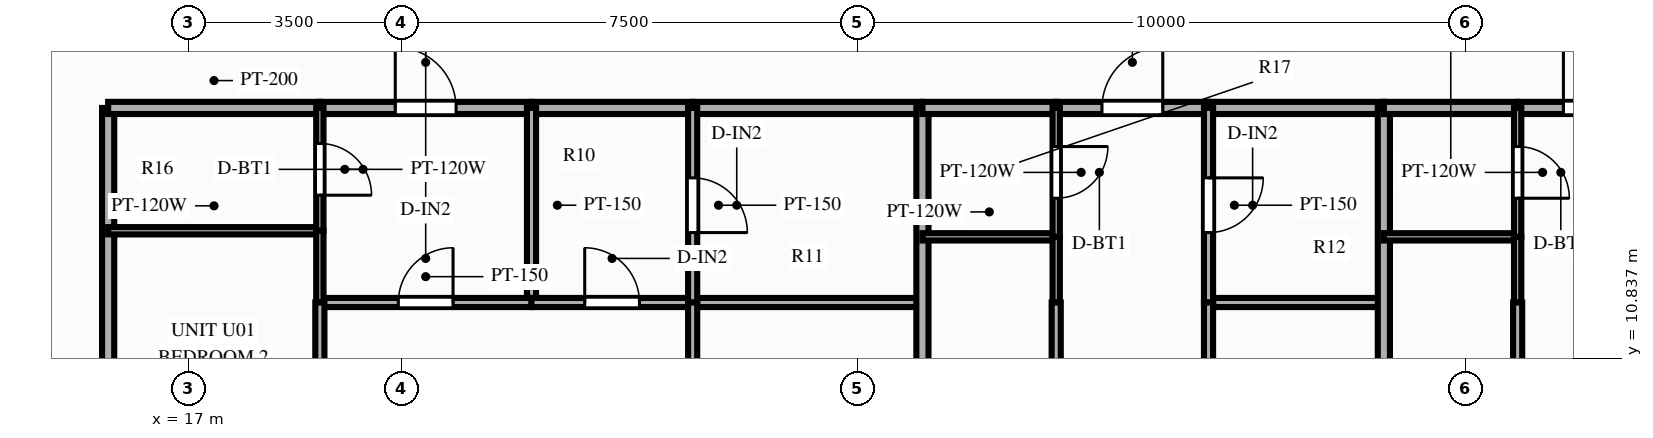
"""IFC4 building model, lengths in metres.
Left out: names, types, materials, properties, quantities, classifications, styles, units other than length and angle.
Written with IfcOpenShell. Run it as: python <this file> out.ifc"""

import sys

from ifc_helpers import new_model, si_unit, direction, frame, frame_2d, origin, place, context, subcontext, project, spatial, rectangle, extrude, source, transform, mapped, element, fill, save


model = new_model("IFC4")
c1 = context("Model", 3, precision=1e-05, world=origin(), true_north=direction((0.0, 1.0)))
c2 = subcontext(c1, "Body", "Model", "MODEL_VIEW")
j1 = project(units=[si_unit("LENGTHUNIT", "METRE"), si_unit("PLANEANGLEUNIT", "RADIAN")], contexts=[c1])
p1 = place(None, origin())
s1 = spatial("IfcSite", under=j1, at=p1, CompositionType="ELEMENT")
p2 = place(p1, origin())
s2 = spatial("IfcBuilding", under=s1, at=p2, CompositionType="ELEMENT")
p3 = place(p2, frame((0.0, 0.0, 61.4)))
s3 = spatial("IfcBuildingStorey", under=s2, at=p3, CompositionType="ELEMENT", Elevation=61.4)
p4 = place(p3, frame((15.68, 14.95, 0.0), z_axis=(0.0, 0.0, 1.0), x_axis=(0.0, -1.0, 0.0)))
e1 = element("IfcWall", 1, at=p4, inside=s3, PredefinedType="PARTITIONING", context=c2, shape_type="SweptSolid", body=[
    extrude(rectangle(XDim=11.8, YDim=0.2, at=frame_2d((5.9, 0.0))), origin(), (0.0, 0.0, 1.0), 2.79),
])
p5 = place(p3, frame((15.68, 14.95, 0.0), z_axis=(0.0, 0.0, 1.0), x_axis=(1.0, 0.0, 0.0)))
e2 = element("IfcWall", 2, at=p5, inside=s3, PredefinedType="PARTITIONING", context=c2, shape_type="SweptSolid", body=[
    extrude(rectangle(XDim=3.482, YDim=0.2, at=frame_2d((1.741, 0.0))), origin(), (0.0, 0.0, 1.0), 2.79),
])
p6 = place(p3, frame((19.162, 14.95, 0.0), z_axis=(0.0, 0.0, 1.0), x_axis=(1.0, 0.0, 0.0)))
e3 = element("IfcWall", 3, at=p6, inside=s3, PredefinedType="PARTITIONING", context=c2, shape_type="SweptSolid", body=[
    extrude(rectangle(XDim=3.481, YDim=0.2, at=frame_2d((1.74, 0.0))), origin(), (0.0, 0.0, 1.0), 2.79),
])
p7 = place(p6, frame((1.24, 0.0, 0.0)))
e4 = element("IfcOpeningElement", 4, at=p7, cuts=e3, PredefinedType="OPENING", context=c2, shape_type="SweptSolid", body=[
    extrude(rectangle(XDim=1.0, YDim=2.15, at=frame_2d((0.5, 1.075))), frame((0.0, 0.112, 0.0), z_axis=(0.0, -1.0, 0.0), x_axis=(1.0, 0.0, 0.0)), (0.0, 0.0, 1.0), 0.224),
])
p8 = place(p3, frame((22.643, 14.95, 0.0), z_axis=(0.0, 0.0, 1.0), x_axis=(1.0, 0.0, 0.0)))
e5 = element("IfcWall", 5, at=p8, inside=s3, PredefinedType="PARTITIONING", context=c2, shape_type="SweptSolid", body=[
    extrude(rectangle(XDim=2.65, YDim=0.2, at=frame_2d((1.325, 0.0))), origin(), (0.0, 0.0, 1.0), 2.79),
])
p9 = place(p3, frame((22.643, 14.95, 0.0), z_axis=(0.0, 0.0, 1.0), x_axis=(0.0, -1.0, 0.0)))
e6 = element("IfcWall", 6, at=p9, inside=s3, PredefinedType="PARTITIONING", context=c2, shape_type="SweptSolid", body=[
    extrude(rectangle(XDim=3.2, YDim=0.15, at=frame_2d((1.6, 0.0))), origin(), (0.0, 0.0, 1.0), 2.79),
])
p10 = place(p3, frame((19.162, 11.75, 0.0), z_axis=(0.0, 0.0, 1.0), x_axis=(1.0, 0.0, 0.0)))
e7 = element("IfcWall", 7, at=p10, inside=s3, PredefinedType="PARTITIONING", context=c2, shape_type="SweptSolid", body=[
    extrude(rectangle(XDim=3.481, YDim=0.15, at=frame_2d((1.74, 0.0))), origin(), (0.0, 0.0, 1.0), 2.79),
])
p11 = place(p10, frame((1.291, 0.0, 0.0)))
e8 = element("IfcOpeningElement", 8, at=p11, cuts=e7, PredefinedType="OPENING", context=c2, shape_type="SweptSolid", body=[
    extrude(rectangle(XDim=0.9, YDim=2.1, at=frame_2d((0.45, 1.05))), frame((0.0, 0.087, 0.0), z_axis=(0.0, -1.0, 0.0), x_axis=(1.0, 0.0, 0.0)), (0.0, 0.0, 1.0), 0.174),
])
p12 = place(p3, frame((22.643, 11.75, 0.0), z_axis=(0.0, 0.0, 1.0), x_axis=(1.0, 0.0, 0.0)))
e9 = element("IfcWall", 9, at=p12, inside=s3, PredefinedType="PARTITIONING", context=c2, shape_type="SweptSolid", body=[
    extrude(rectangle(XDim=2.65, YDim=0.15, at=frame_2d((1.325, 0.0))), origin(), (0.0, 0.0, 1.0), 2.79),
])
p13 = place(p12, frame((0.875, 0.0, 0.0)))
e10 = element("IfcOpeningElement", 10, at=p13, cuts=e9, PredefinedType="OPENING", context=c2, shape_type="SweptSolid", body=[
    extrude(rectangle(XDim=0.9, YDim=2.1, at=frame_2d((0.45, 1.05))), frame((0.0, 0.087, 0.0), z_axis=(0.0, -1.0, 0.0), x_axis=(1.0, 0.0, 0.0)), (0.0, 0.0, 1.0), 0.174),
])
p14 = place(p3, frame((25.293, 14.95, 0.0), z_axis=(0.0, 0.0, 1.0), x_axis=(1.0, 0.0, 0.0)))
e11 = element("IfcWall", 11, at=p14, inside=s3, PredefinedType="PARTITIONING", context=c2, shape_type="SweptSolid", body=[
    extrude(rectangle(XDim=3.779, YDim=0.2, at=frame_2d((1.89, 0.0))), origin(), (0.0, 0.0, 1.0), 2.79),
])
p15 = place(p3, frame((15.68, 12.93, 0.0), z_axis=(0.0, 0.0, 1.0), x_axis=(1.0, 0.0, 0.0)))
e12 = element("IfcWall", 12, at=p15, inside=s3, PredefinedType="PARTITIONING", context=c2, shape_type="SweptSolid", body=[
    extrude(rectangle(XDim=3.482, YDim=0.12, at=frame_2d((1.741, 0.0))), origin(), (0.0, 0.0, 1.0), 2.79),
])
p16 = place(p3, frame((25.293, 11.75, 0.0), z_axis=(0.0, 0.0, 1.0), x_axis=(1.0, 0.0, 0.0)))
e13 = element("IfcWall", 13, at=p16, inside=s3, PredefinedType="PARTITIONING", context=c2, shape_type="SweptSolid", body=[
    extrude(rectangle(XDim=3.779, YDim=0.15, at=frame_2d((1.89, 0.0))), origin(), (0.0, 0.0, 1.0), 2.79),
])
p17 = place(p3, frame((19.162, 14.95, 0.0), z_axis=(0.0, 0.0, 1.0), x_axis=(0.0, -1.0, 0.0)))
e14 = element("IfcWall", 14, at=p17, inside=s3, PredefinedType="PARTITIONING", context=c2, shape_type="SweptSolid", body=[
    extrude(rectangle(XDim=2.02, YDim=0.12, at=frame_2d((1.01, 0.0))), origin(), (0.0, 0.0, 1.0), 2.79),
])
p18 = place(p17, frame((0.585, 0.0, 0.0)))
e15 = element("IfcOpeningElement", 15, at=p18, cuts=e14, PredefinedType="OPENING", context=c2, shape_type="SweptSolid", body=[
    extrude(rectangle(XDim=0.85, YDim=2.05, at=frame_2d((0.425, 1.025))), frame((0.0, 0.072, 0.0), z_axis=(0.0, -1.0, 0.0), x_axis=(1.0, 0.0, 0.0)), (0.0, 0.0, 1.0), 0.144),
])
p19 = place(p3, frame((19.162, 12.93, 0.0), z_axis=(0.0, 0.0, 1.0), x_axis=(0.0, -1.0, 0.0)))
e16 = element("IfcWall", 16, at=p19, inside=s3, PredefinedType="PARTITIONING", context=c2, shape_type="SweptSolid", body=[
    extrude(rectangle(XDim=1.18, YDim=0.12, at=frame_2d((0.59, 0.0))), origin(), (0.0, 0.0, 1.0), 2.79),
])
p20 = place(p3, frame((19.162, 11.75, 0.0), z_axis=(0.0, 0.0, 1.0), x_axis=(0.0, -1.0, 0.0)))
e17 = element("IfcWall", 17, at=p20, inside=s3, PredefinedType="PARTITIONING", context=c2, shape_type="SweptSolid", body=[
    extrude(rectangle(XDim=8.6, YDim=0.15, at=frame_2d((4.3, 0.0))), origin(), (0.0, 0.0, 1.0), 2.79),
])
p21 = place(p20, frame((3.549, 0.0, 0.0)))
e18 = element("IfcOpeningElement", 18, at=p21, cuts=e17, PredefinedType="OPENING", context=c2, shape_type="SweptSolid", body=[
    extrude(rectangle(XDim=0.9, YDim=2.1, at=frame_2d((0.45, 1.05))), frame((0.0, 0.087, 0.0), z_axis=(0.0, -1.0, 0.0), x_axis=(1.0, 0.0, 0.0)), (0.0, 0.0, 1.0), 0.174),
])
p22 = place(p3, frame((25.293, 14.95, 0.0), z_axis=(0.0, 0.0, 1.0), x_axis=(0.0, -1.0, 0.0)))
e19 = element("IfcWall", 19, at=p22, inside=s3, PredefinedType="PARTITIONING", context=c2, shape_type="SweptSolid", body=[
    extrude(rectangle(XDim=3.2, YDim=0.15, at=frame_2d((1.6, 0.0))), origin(), (0.0, 0.0, 1.0), 2.79),
])
p23 = place(p22, frame((1.15, 0.0, 0.0)))
e20 = element("IfcOpeningElement", 20, at=p23, cuts=e19, PredefinedType="OPENING", context=c2, shape_type="SweptSolid", body=[
    extrude(rectangle(XDim=0.9, YDim=2.1, at=frame_2d((0.45, 1.05))), frame((0.0, 0.087, 0.0), z_axis=(0.0, -1.0, 0.0), x_axis=(1.0, 0.0, 0.0)), (0.0, 0.0, 1.0), 0.174),
])
p24 = place(p3, frame((25.293, 11.75, 0.0), z_axis=(0.0, 0.0, 1.0), x_axis=(0.0, -1.0, 0.0)))
e21 = element("IfcWall", 21, at=p24, inside=s3, PredefinedType="PARTITIONING", context=c2, shape_type="SweptSolid", body=[
    extrude(rectangle(XDim=8.6, YDim=0.15, at=frame_2d((4.3, 0.0))), origin(), (0.0, 0.0, 1.0), 2.79),
])
p25 = place(p24, frame((3.549, 0.0, 0.0)))
e22 = element("IfcOpeningElement", 22, at=p25, cuts=e21, PredefinedType="OPENING", context=c2, shape_type="SweptSolid", body=[
    extrude(rectangle(XDim=0.9, YDim=2.1, at=frame_2d((0.45, 1.05))), frame((0.0, 0.087, 0.0), z_axis=(0.0, -1.0, 0.0), x_axis=(1.0, 0.0, 0.0)), (0.0, 0.0, 1.0), 0.174),
])
p26 = place(p3, frame((29.072, 14.95, 0.0), z_axis=(0.0, 0.0, 1.0), x_axis=(0.0, -1.0, 0.0)))
e23 = element("IfcWall", 23, at=p26, inside=s3, PredefinedType="PARTITIONING", context=c2, shape_type="SweptSolid", body=[
    extrude(rectangle(XDim=11.8, YDim=0.2, at=frame_2d((5.9, 0.0))), origin(), (0.0, 0.0, 1.0), 2.79),
])
p27 = place(p3, frame((29.072, 14.95, 0.0), z_axis=(0.0, 0.0, 1.0), x_axis=(1.0, 0.0, 0.0)))
e24 = element("IfcWall", 24, at=p27, inside=s3, PredefinedType="PARTITIONING", context=c2, shape_type="SweptSolid", body=[
    extrude(rectangle(XDim=2.2, YDim=0.2, at=frame_2d((1.1, 0.0))), origin(), (0.0, 0.0, 1.0), 2.79),
])
p28 = place(p3, frame((31.272, 14.95, 0.0), z_axis=(0.0, 0.0, 1.0), x_axis=(1.0, 0.0, 0.0)))
e25 = element("IfcWall", 25, at=p28, inside=s3, PredefinedType="PARTITIONING", context=c2, shape_type="SweptSolid", body=[
    extrude(rectangle(XDim=2.505, YDim=0.2, at=frame_2d((1.252, 0.0))), origin(), (0.0, 0.0, 1.0), 2.79),
])
p29 = place(p28, frame((0.752, 0.0, 0.0)))
e26 = element("IfcOpeningElement", 26, at=p29, cuts=e25, PredefinedType="OPENING", context=c2, shape_type="SweptSolid", body=[
    extrude(rectangle(XDim=1.0, YDim=2.15, at=frame_2d((0.5, 1.075))), frame((0.0, 0.112, 0.0), z_axis=(0.0, -1.0, 0.0), x_axis=(1.0, 0.0, 0.0)), (0.0, 0.0, 1.0), 0.224),
])
p30 = place(p3, frame((33.777, 14.95, 0.0), z_axis=(0.0, 0.0, 1.0), x_axis=(1.0, 0.0, 0.0)))
e27 = element("IfcWall", 27, at=p30, inside=s3, PredefinedType="PARTITIONING", context=c2, shape_type="SweptSolid", body=[
    extrude(rectangle(XDim=2.884, YDim=0.2, at=frame_2d((1.442, 0.0))), origin(), (0.0, 0.0, 1.0), 2.79),
])
p31 = place(p3, frame((29.072, 12.83, 0.0), z_axis=(0.0, 0.0, 1.0), x_axis=(1.0, 0.0, 0.0)))
e28 = element("IfcWall", 28, at=p31, inside=s3, PredefinedType="PARTITIONING", context=c2, shape_type="SweptSolid", body=[
    extrude(rectangle(XDim=2.2, YDim=0.12, at=frame_2d((1.1, 0.0))), origin(), (0.0, 0.0, 1.0), 2.79),
])
p32 = place(p3, frame((33.777, 11.75, 0.0), z_axis=(0.0, 0.0, 1.0), x_axis=(1.0, 0.0, 0.0)))
e29 = element("IfcWall", 29, at=p32, inside=s3, PredefinedType="PARTITIONING", context=c2, shape_type="SweptSolid", body=[
    extrude(rectangle(XDim=2.884, YDim=0.15, at=frame_2d((1.442, 0.0))), origin(), (0.0, 0.0, 1.0), 2.79),
])
p33 = place(p3, frame((31.272, 14.95, 0.0), z_axis=(0.0, 0.0, 1.0), x_axis=(0.0, -1.0, 0.0)))
e30 = element("IfcWall", 30, at=p33, inside=s3, PredefinedType="PARTITIONING", context=c2, shape_type="SweptSolid", body=[
    extrude(rectangle(XDim=2.12, YDim=0.12, at=frame_2d((1.06, 0.0))), origin(), (0.0, 0.0, 1.0), 2.24),
])
p34 = place(p33, frame((0.635, 0.0, 0.0)))
e31 = element("IfcOpeningElement", 31, at=p34, cuts=e30, PredefinedType="OPENING", context=c2, shape_type="SweptSolid", body=[
    extrude(rectangle(XDim=0.85, YDim=2.05, at=frame_2d((0.425, 1.025))), frame((0.0, 0.072, 0.0), z_axis=(0.0, -1.0, 0.0), x_axis=(1.0, 0.0, 0.0)), (0.0, 0.0, 1.0), 0.144),
])
p35 = place(p3, frame((31.272, 12.83, 0.0), z_axis=(0.0, 0.0, 1.0), x_axis=(0.0, -1.0, 0.0)))
e32 = element("IfcWall", 32, at=p35, inside=s3, PredefinedType="PARTITIONING", context=c2, shape_type="SweptSolid", body=[
    extrude(rectangle(XDim=1.08, YDim=0.12, at=frame_2d((0.54, 0.0))), origin(), (0.0, 0.0, 1.0), 2.24),
])
p36 = place(p3, frame((31.272, 11.75, 0.0), z_axis=(0.0, 0.0, 1.0), x_axis=(0.0, -1.0, 0.0)))
e33 = element("IfcWall", 33, at=p36, inside=s3, PredefinedType="PARTITIONING", context=c2, shape_type="SweptSolid", body=[
    extrude(rectangle(XDim=8.6, YDim=0.15, at=frame_2d((4.3, 0.0))), origin(), (0.0, 0.0, 1.0), 2.24),
])
p37 = place(p36, frame((3.549, 0.0, 0.0)))
e34 = element("IfcOpeningElement", 34, at=p37, cuts=e33, PredefinedType="OPENING", context=c2, shape_type="SweptSolid", body=[
    extrude(rectangle(XDim=0.9, YDim=2.1, at=frame_2d((0.45, 1.05))), frame((0.0, 0.087, 0.0), z_axis=(0.0, -1.0, 0.0), x_axis=(1.0, 0.0, 0.0)), (0.0, 0.0, 1.0), 0.174),
])
p38 = place(p3, frame((33.777, 14.95, 0.0), z_axis=(0.0, 0.0, 1.0), x_axis=(0.0, -1.0, 0.0)))
e35 = element("IfcWall", 35, at=p38, inside=s3, PredefinedType="PARTITIONING", context=c2, shape_type="SweptSolid", body=[
    extrude(rectangle(XDim=3.2, YDim=0.15, at=frame_2d((1.6, 0.0))), origin(), (0.0, 0.0, 1.0), 2.79),
])
p39 = place(p38, frame((1.15, 0.0, 0.0)))
e36 = element("IfcOpeningElement", 36, at=p39, cuts=e35, PredefinedType="OPENING", context=c2, shape_type="SweptSolid", body=[
    extrude(rectangle(XDim=0.9, YDim=2.1, at=frame_2d((0.45, 1.05))), frame((0.0, 0.087, 0.0), z_axis=(0.0, -1.0, 0.0), x_axis=(1.0, 0.0, 0.0)), (0.0, 0.0, 1.0), 0.174),
])
p40 = place(p3, frame((33.777, 11.75, 0.0), z_axis=(0.0, 0.0, 1.0), x_axis=(0.0, -1.0, 0.0)))
e37 = element("IfcWall", 37, at=p40, inside=s3, PredefinedType="PARTITIONING", context=c2, shape_type="SweptSolid", body=[
    extrude(rectangle(XDim=8.6, YDim=0.15, at=frame_2d((4.3, 0.0))), origin(), (0.0, 0.0, 1.0), 2.79),
])
p41 = place(p40, frame((3.549, 0.0, 0.0)))
e38 = element("IfcOpeningElement", 38, at=p41, cuts=e37, PredefinedType="OPENING", context=c2, shape_type="SweptSolid", body=[
    extrude(rectangle(XDim=0.9, YDim=2.1, at=frame_2d((0.45, 1.05))), frame((0.0, 0.087, 0.0), z_axis=(0.0, -1.0, 0.0), x_axis=(1.0, 0.0, 0.0)), (0.0, 0.0, 1.0), 0.174),
])
p42 = place(p3, frame((36.661, 14.95, 0.0), z_axis=(0.0, 0.0, 1.0), x_axis=(0.0, -1.0, 0.0)))
e39 = element("IfcWall", 39, at=p42, inside=s3, PredefinedType="PARTITIONING", context=c2, shape_type="SweptSolid", body=[
    extrude(rectangle(XDim=11.8, YDim=0.2, at=frame_2d((5.9, 0.0))), origin(), (0.0, 0.0, 1.0), 2.79),
])
p43 = place(p3, frame((36.661, 14.95, 0.0), z_axis=(0.0, 0.0, 1.0), x_axis=(1.0, 0.0, 0.0)))
e40 = element("IfcWall", 40, at=p43, inside=s3, PredefinedType="PARTITIONING", context=c2, shape_type="SweptSolid", body=[
    extrude(rectangle(XDim=2.2, YDim=0.2, at=frame_2d((1.1, 0.0))), origin(), (0.0, 0.0, 1.0), 2.79),
])
p44 = place(p3, frame((38.861, 14.95, 0.0), z_axis=(0.0, 0.0, 1.0), x_axis=(1.0, 0.0, 0.0)))
e41 = element("IfcWall", 41, at=p44, inside=s3, PredefinedType="PARTITIONING", context=c2, shape_type="SweptSolid", body=[
    extrude(rectangle(XDim=2.505, YDim=0.2, at=frame_2d((1.252, 0.0))), origin(), (0.0, 0.0, 1.0), 2.79),
])
p45 = place(p44, frame((0.753, 0.0, 0.0)))
e42 = element("IfcOpeningElement", 42, at=p45, cuts=e41, PredefinedType="OPENING", context=c2, shape_type="SweptSolid", body=[
    extrude(rectangle(XDim=1.0, YDim=2.15, at=frame_2d((0.5, 1.075))), frame((0.0, 0.112, 0.0), z_axis=(0.0, -1.0, 0.0), x_axis=(1.0, 0.0, 0.0)), (0.0, 0.0, 1.0), 0.224),
])
p46 = place(p3, frame((36.661, 12.83, 0.0), z_axis=(0.0, 0.0, 1.0), x_axis=(1.0, 0.0, 0.0)))
e43 = element("IfcWall", 43, at=p46, inside=s3, PredefinedType="PARTITIONING", context=c2, shape_type="SweptSolid", body=[
    extrude(rectangle(XDim=2.2, YDim=0.12, at=frame_2d((1.1, 0.0))), origin(), (0.0, 0.0, 1.0), 2.79),
])
p47 = place(p3, frame((38.861, 14.95, 0.0), z_axis=(0.0, 0.0, 1.0), x_axis=(0.0, -1.0, 0.0)))
e44 = element("IfcWall", 44, at=p47, inside=s3, PredefinedType="PARTITIONING", context=c2, shape_type="SweptSolid", body=[
    extrude(rectangle(XDim=2.12, YDim=0.12, at=frame_2d((1.06, 0.0))), origin(), (0.0, 0.0, 1.0), 2.79),
])
p48 = place(p47, frame((0.635, 0.0, 0.0)))
e45 = element("IfcOpeningElement", 45, at=p48, cuts=e44, PredefinedType="OPENING", context=c2, shape_type="SweptSolid", body=[
    extrude(rectangle(XDim=0.85, YDim=2.05, at=frame_2d((0.425, 1.025))), frame((0.0, 0.072, 0.0), z_axis=(0.0, -1.0, 0.0), x_axis=(1.0, 0.0, 0.0)), (0.0, 0.0, 1.0), 0.144),
])
p49 = place(p3, frame((38.861, 12.83, 0.0), z_axis=(0.0, 0.0, 1.0), x_axis=(0.0, -1.0, 0.0)))
e46 = element("IfcWall", 46, at=p49, inside=s3, PredefinedType="PARTITIONING", context=c2, shape_type="SweptSolid", body=[
    extrude(rectangle(XDim=1.08, YDim=0.12, at=frame_2d((0.54, 0.0))), origin(), (0.0, 0.0, 1.0), 2.79),
])
p50 = place(p3, frame((38.861, 11.75, 0.0), z_axis=(0.0, 0.0, 1.0), x_axis=(0.0, -1.0, 0.0)))
e47 = element("IfcWall", 47, at=p50, inside=s3, PredefinedType="PARTITIONING", context=c2, shape_type="SweptSolid", body=[
    extrude(rectangle(XDim=8.6, YDim=0.15, at=frame_2d((4.3, 0.0))), origin(), (0.0, 0.0, 1.0), 2.79),
])
p51 = place(p50, frame((3.549, 0.0, 0.0)))
e48 = element("IfcOpeningElement", 48, at=p51, cuts=e47, PredefinedType="OPENING", context=c2, shape_type="SweptSolid", body=[
    extrude(rectangle(XDim=0.9, YDim=2.1, at=frame_2d((0.45, 1.05))), frame((0.0, 0.087, 0.0), z_axis=(0.0, -1.0, 0.0), x_axis=(1.0, 0.0, 0.0)), (0.0, 0.0, 1.0), 0.174),
])
m1 = source(origin(), c2, "Body", "SweptSolid", [
    extrude(rectangle(XDim=1.0, YDim=2.15, at=frame_2d((0.5, 1.075))), frame((0.0, 0.025, 0.0), z_axis=(0.0, -1.0, 0.0), x_axis=(1.0, 0.0, 0.0)), (0.0, 0.0, 1.0), 0.05),
])
p52 = place(p7, origin())
e49 = element("IfcDoor", 49, at=p52, inside=s3, OperationType="SINGLE_SWING_LEFT", PredefinedType="DOOR", context=c2, shape_type="MappedRepresentation", body=[
    mapped(m1, transform((0.0, 0.0, 0.0), scale=1.0)),
])
fill(e4, e49)
m2 = source(origin(), c2, "Body", "SweptSolid", [
    extrude(rectangle(XDim=0.9, YDim=2.1, at=frame_2d((0.45, 1.05))), frame((0.0, 0.025, 0.0), z_axis=(0.0, -1.0, 0.0), x_axis=(1.0, 0.0, 0.0)), (0.0, 0.0, 1.0), 0.05),
])
p53 = place(p11, origin())
e50 = element("IfcDoor", 50, at=p53, inside=s3, OperationType="SINGLE_SWING_RIGHT", PredefinedType="DOOR", context=c2, shape_type="MappedRepresentation", body=[
    mapped(m2, transform((0.0, 0.0, 0.0), scale=1.0)),
])
fill(e8, e50)
p54 = place(p13, origin())
e51 = element("IfcDoor", 51, at=p54, inside=s3, OperationType="SINGLE_SWING_LEFT", PredefinedType="DOOR", context=c2, shape_type="MappedRepresentation", body=[
    mapped(m2, transform((0.0, 0.0, 0.0), scale=1.0)),
])
fill(e10, e51)
m3 = source(origin(), c2, "Body", "SweptSolid", [
    extrude(rectangle(XDim=0.85, YDim=2.05, at=frame_2d((0.425, 1.025))), frame((0.0, 0.025, 0.0), z_axis=(0.0, -1.0, 0.0), x_axis=(1.0, 0.0, 0.0)), (0.0, 0.0, 1.0), 0.05),
])
p55 = place(p18, origin())
e52 = element("IfcDoor", 52, at=p55, inside=s3, OperationType="SINGLE_SWING_RIGHT", PredefinedType="DOOR", context=c2, shape_type="MappedRepresentation", body=[
    mapped(m3, transform((0.0, 0.0, 0.0), scale=1.0)),
])
fill(e15, e52)
p56 = place(p23, origin())
e53 = element("IfcDoor", 53, at=p56, inside=s3, OperationType="SINGLE_SWING_RIGHT", PredefinedType="DOOR", context=c2, shape_type="MappedRepresentation", body=[
    mapped(m2, transform((0.0, 0.0, 0.0), scale=1.0)),
])
fill(e20, e53)
p57 = place(p29, origin())
e54 = element("IfcDoor", 54, at=p57, inside=s3, OperationType="SINGLE_SWING_RIGHT", PredefinedType="DOOR", context=c2, shape_type="MappedRepresentation", body=[
    mapped(m1, transform((0.0, 0.0, 0.0), scale=1.0)),
])
fill(e26, e54)
p58 = place(p34, origin())
e55 = element("IfcDoor", 55, at=p58, inside=s3, OperationType="SINGLE_SWING_LEFT", PredefinedType="DOOR", context=c2, shape_type="MappedRepresentation", body=[
    mapped(m3, transform((0.0, 0.0, 0.0), scale=1.0)),
])
fill(e31, e55)
p59 = place(p39, origin())
e56 = element("IfcDoor", 56, at=p59, inside=s3, OperationType="SINGLE_SWING_LEFT", PredefinedType="DOOR", context=c2, shape_type="MappedRepresentation", body=[
    mapped(m2, transform((0.0, 0.0, 0.0), scale=1.0)),
])
fill(e36, e56)
p60 = place(p45, origin())
e57 = element("IfcDoor", 57, at=p60, inside=s3, OperationType="SINGLE_SWING_LEFT", PredefinedType="DOOR", context=c2, shape_type="MappedRepresentation", body=[
    mapped(m1, transform((0.0, 0.0, 0.0), scale=1.0)),
])
fill(e42, e57)
p61 = place(p48, origin())
e58 = element("IfcDoor", 58, at=p61, inside=s3, OperationType="SINGLE_SWING_RIGHT", PredefinedType="DOOR", context=c2, shape_type="MappedRepresentation", body=[
    mapped(m3, transform((0.0, 0.0, 0.0), scale=1.0)),
])
fill(e45, e58)
save(model, sys.argv[1])
